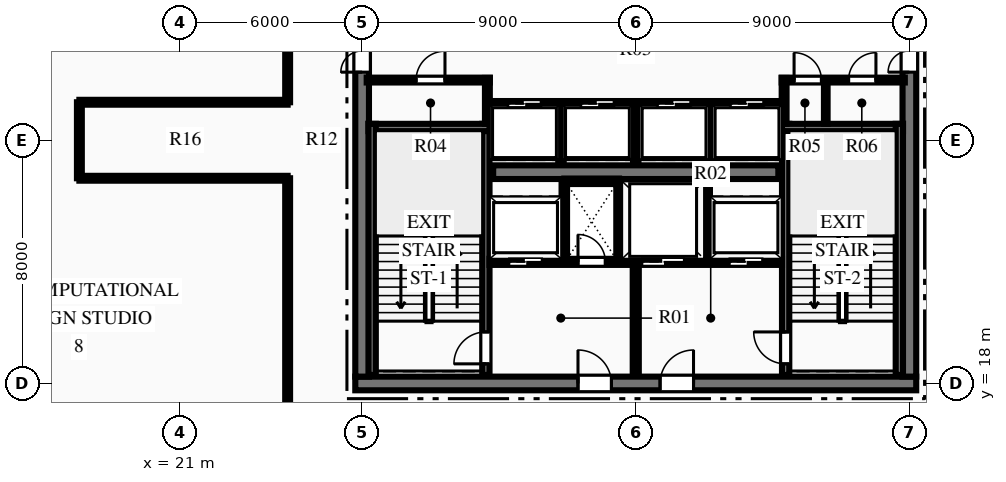
"""IFC4 building model, lengths in metres.
Left out: names, types, materials, properties, quantities, classifications, styles, units other than length and angle.
Written with IfcOpenShell. Run it as: python <this file> out.ifc"""

import sys

from ifc_helpers import new_model, si_unit, direction, frame, frame_2d, origin, place, context, subcontext, project, spatial, rectangle, extrude, element, fill, save


model = new_model("IFC4")
c1 = context("Model", 3, precision=1e-05, world=origin(), true_north=direction((0.0, 1.0)))
c2 = subcontext(c1, "Body", "Model", "MODEL_VIEW")
j1 = project(units=[si_unit("LENGTHUNIT", "METRE"), si_unit("PLANEANGLEUNIT", "RADIAN")], contexts=[c1])
p1 = place(None, origin())
s1 = spatial("IfcSite", under=j1, at=p1, CompositionType="ELEMENT")
p2 = place(p1, origin())
s2 = spatial("IfcBuilding", under=s1, at=p2, CompositionType="ELEMENT")
p3 = place(p2, frame((0.0, 0.0, 263.7)))
s3 = spatial("IfcBuildingStorey", under=s2, at=p3, CompositionType="ELEMENT", Elevation=263.7)
p4 = place(p3, frame((26.775, 18.0, 0.0), z_axis=(0.0, 0.0, 1.0), x_axis=(1.0, 0.0, 0.0)))
e1 = element("IfcWall", 1, at=p4, inside=s3, PredefinedType="SHEAR", context=c2, shape_type="SweptSolid", body=[
    extrude(rectangle(XDim=18.45, YDim=0.45, at=frame_2d((9.225, 0.0))), origin(), (0.0, 0.0, 1.0), 3.75),
])
p5 = place(p4, frame((7.325, 0.0, 0.0)))
e2 = element("IfcOpeningElement", 2, at=p5, cuts=e1, PredefinedType="OPENING", context=c2, shape_type="SweptSolid", body=[
    extrude(rectangle(XDim=1.1, YDim=2.15, at=frame_2d((0.55, 1.075))), frame((0.0, 0.235, 0.0), z_axis=(0.0, -1.0, 0.0), x_axis=(1.0, 0.0, 0.0)), (0.0, 0.0, 1.0), 0.47),
])
p6 = place(p4, frame((10.025, 0.0, 0.0)))
e3 = element("IfcOpeningElement", 3, at=p6, cuts=e1, PredefinedType="OPENING", context=c2, shape_type="SweptSolid", body=[
    extrude(rectangle(XDim=1.1, YDim=2.15, at=frame_2d((0.55, 1.075))), frame((0.0, 0.235, 0.0), z_axis=(0.0, -1.0, 0.0), x_axis=(1.0, 0.0, 0.0)), (0.0, 0.0, 1.0), 0.47),
])
p7 = place(p3, frame((27.0, 18.225, 0.0), z_axis=(0.0, 0.0, 1.0), x_axis=(0.0, 1.0, 0.0)))
e4 = element("IfcWall", 4, at=p7, inside=s3, PredefinedType="SHEAR", context=c2, shape_type="SweptSolid", body=[
    extrude(rectangle(XDim=15.55, YDim=0.45, at=frame_2d((7.775, 0.0))), origin(), (0.0, 0.0, 1.0), 3.75),
])
p8 = place(p7, frame((10.015, 0.0, 0.0)))
e5 = element("IfcOpeningElement", 5, at=p8, cuts=e4, PredefinedType="OPENING", context=c2, shape_type="SweptSolid", body=[
    extrude(rectangle(XDim=1.4, YDim=2.2, at=frame_2d((0.7, 1.1))), frame((0.0, 0.235, 0.0), z_axis=(0.0, -1.0, 0.0), x_axis=(1.0, 0.0, 0.0)), (0.0, 0.0, 1.0), 0.47),
])
p9 = place(p3, frame((45.0, 18.225, 0.0), z_axis=(0.0, 0.0, 1.0), x_axis=(0.0, 1.0, 0.0)))
e6 = element("IfcWall", 6, at=p9, inside=s3, PredefinedType="SHEAR", context=c2, shape_type="SweptSolid", body=[
    extrude(rectangle(XDim=15.55, YDim=0.45, at=frame_2d((7.775, 0.0))), origin(), (0.0, 0.0, 1.0), 3.75),
])
p10 = place(p9, frame((10.015, 0.0, 0.0)))
e7 = element("IfcOpeningElement", 7, at=p10, cuts=e6, PredefinedType="OPENING", context=c2, shape_type="SweptSolid", body=[
    extrude(rectangle(XDim=1.4, YDim=2.2, at=frame_2d((0.7, 1.1))), frame((0.0, 0.235, 0.0), z_axis=(0.0, -1.0, 0.0), x_axis=(1.0, 0.0, 0.0)), (0.0, 0.0, 1.0), 0.47),
])
p11 = place(p3, frame((31.31, 24.95, 0.0), z_axis=(0.0, 0.0, 1.0), x_axis=(1.0, 0.0, 0.0)))
e8 = element("IfcWall", 8, at=p11, inside=s3, PredefinedType="SHEAR", context=c2, shape_type="SweptSolid", body=[
    extrude(rectangle(XDim=9.38, YDim=0.45, at=frame_2d((4.69, 0.0))), origin(), (0.0, 0.0, 1.0), 3.75),
])
p12 = place(p3, frame((31.07, 18.28, 0.0), z_axis=(0.0, 0.0, 1.0), x_axis=(0.0, 1.0, 0.0)))
e9 = element("IfcWall", 9, at=p12, inside=s3, PredefinedType="SHEAR", context=c2, shape_type="SweptSolid", body=[
    extrude(rectangle(XDim=8.26, YDim=0.24, at=frame_2d((4.13, 0.0))), origin(), (0.0, 0.0, 1.0), 3.75),
])
p13 = place(p12, frame((0.365, 0.0, 0.0)))
e10 = element("IfcOpeningElement", 10, at=p13, cuts=e9, PredefinedType="OPENING", context=c2, shape_type="SweptSolid", body=[
    extrude(rectangle(XDim=1.05, YDim=2.15, at=frame_2d((0.525, 1.075))), frame((0.0, 0.13, 0.0), z_axis=(0.0, -1.0, 0.0), x_axis=(1.0, 0.0, 0.0)), (0.0, 0.0, 1.0), 0.26),
])
p14 = place(p3, frame((27.21, 26.42, 0.0), z_axis=(0.0, 0.0, 1.0), x_axis=(1.0, 0.0, 0.0)))
e11 = element("IfcWall", 11, at=p14, inside=s3, PredefinedType="SHEAR", context=c2, shape_type="SweptSolid", body=[
    extrude(rectangle(XDim=3.98, YDim=0.24, at=frame_2d((1.99, 0.0))), origin(), (0.0, 0.0, 1.0), 3.75),
])
p15 = place(p3, frame((27.33, 18.28, 0.0), z_axis=(0.0, 0.0, 1.0), x_axis=(0.0, 1.0, 0.0)))
e12 = element("IfcWall", 12, at=p15, inside=s3, PredefinedType="SHEAR", context=c2, shape_type="SweptSolid", body=[
    extrude(rectangle(XDim=8.26, YDim=0.24, at=frame_2d((4.13, 0.0))), origin(), (0.0, 0.0, 1.0), 3.75),
])
p16 = place(p3, frame((40.93, 18.28, 0.0), z_axis=(0.0, 0.0, 1.0), x_axis=(0.0, 1.0, 0.0)))
e13 = element("IfcWall", 13, at=p16, inside=s3, PredefinedType="SHEAR", context=c2, shape_type="SweptSolid", body=[
    extrude(rectangle(XDim=8.26, YDim=0.24, at=frame_2d((4.13, 0.0))), origin(), (0.0, 0.0, 1.0), 3.75),
])
p17 = place(p16, frame((0.365, 0.0, 0.0)))
e14 = element("IfcOpeningElement", 14, at=p17, cuts=e13, PredefinedType="OPENING", context=c2, shape_type="SweptSolid", body=[
    extrude(rectangle(XDim=1.05, YDim=2.15, at=frame_2d((0.525, 1.075))), frame((0.0, 0.13, 0.0), z_axis=(0.0, -1.0, 0.0), x_axis=(1.0, 0.0, 0.0)), (0.0, 0.0, 1.0), 0.26),
])
p18 = place(p3, frame((40.81, 26.42, 0.0), z_axis=(0.0, 0.0, 1.0), x_axis=(1.0, 0.0, 0.0)))
e15 = element("IfcWall", 15, at=p18, inside=s3, PredefinedType="SHEAR", context=c2, shape_type="SweptSolid", body=[
    extrude(rectangle(XDim=3.98, YDim=0.24, at=frame_2d((1.99, 0.0))), origin(), (0.0, 0.0, 1.0), 3.75),
])
p19 = place(p3, frame((44.67, 18.28, 0.0), z_axis=(0.0, 0.0, 1.0), x_axis=(0.0, 1.0, 0.0)))
e16 = element("IfcWall", 16, at=p19, inside=s3, PredefinedType="SHEAR", context=c2, shape_type="SweptSolid", body=[
    extrude(rectangle(XDim=8.26, YDim=0.24, at=frame_2d((4.13, 0.0))), origin(), (0.0, 0.0, 1.0), 3.75),
])
p20 = place(p3, frame((36.0, 18.28, 0.0), z_axis=(0.0, 0.0, 1.0), x_axis=(0.0, 1.0, 0.0)))
e17 = element("IfcWall", 17, at=p20, inside=s3, PredefinedType="PARTITIONING", context=c2, shape_type="SweptSolid", body=[
    extrude(rectangle(XDim=3.77, YDim=0.2, at=frame_2d((1.885, 0.0))), origin(), (0.0, 0.0, 1.0), 3.48),
])
p21 = place(p3, frame((31.19, 22.0, 0.0), z_axis=(0.0, 0.0, 1.0), x_axis=(1.0, 0.0, 0.0)))
e18 = element("IfcWall", 18, at=p21, inside=s3, PredefinedType="PARTITIONING", context=c2, shape_type="SweptSolid", body=[
    extrude(rectangle(XDim=4.69, YDim=0.2, at=frame_2d((2.345, 0.0))), origin(), (0.0, 0.0, 1.0), 3.48),
])
p22 = place(p21, frame((2.91, 0.0, 0.0)))
e19 = element("IfcOpeningElement", 19, at=p22, cuts=e18, PredefinedType="OPENING", context=c2, shape_type="SweptSolid", body=[
    extrude(rectangle(XDim=0.9, YDim=2.15, at=frame_2d((0.45, 1.075))), frame((0.0, 0.11, 0.0), z_axis=(0.0, -1.0, 0.0), x_axis=(1.0, 0.0, 0.0)), (0.0, 0.0, 1.0), 0.22),
])
p23 = place(p21, frame((0.635, 0.0, 0.0)))
e20 = element("IfcOpeningElement", 20, at=p23, cuts=e18, PredefinedType="OPENING", context=c2, shape_type="SweptSolid", body=[
    extrude(rectangle(XDim=1.1, YDim=2.15, at=frame_2d((0.55, 1.075))), frame((0.0, 0.11, 0.0), z_axis=(0.0, -1.0, 0.0), x_axis=(1.0, 0.0, 0.0)), (0.0, 0.0, 1.0), 0.22),
])
p24 = place(p3, frame((36.12, 22.0, 0.0), z_axis=(0.0, 0.0, 1.0), x_axis=(1.0, 0.0, 0.0)))
e21 = element("IfcWall", 21, at=p24, inside=s3, PredefinedType="PARTITIONING", context=c2, shape_type="SweptSolid", body=[
    extrude(rectangle(XDim=4.69, YDim=0.2, at=frame_2d((2.345, 0.0))), origin(), (0.0, 0.0, 1.0), 3.48),
])
p25 = place(p24, frame((2.955, 0.0, 0.0)))
e22 = element("IfcOpeningElement", 22, at=p25, cuts=e21, PredefinedType="OPENING", context=c2, shape_type="SweptSolid", body=[
    extrude(rectangle(XDim=1.1, YDim=2.15, at=frame_2d((0.55, 1.075))), frame((0.0, 0.11, 0.0), z_axis=(0.0, -1.0, 0.0), x_axis=(1.0, 0.0, 0.0)), (0.0, 0.0, 1.0), 0.22),
])
p26 = place(p24, frame((0.08, 0.0, 0.0)))
e23 = element("IfcOpeningElement", 23, at=p26, cuts=e21, PredefinedType="OPENING", context=c2, shape_type="SweptSolid", body=[
    extrude(rectangle(XDim=1.4, YDim=2.2, at=frame_2d((0.7, 1.1))), frame((0.0, 0.11, 0.0), z_axis=(0.0, -1.0, 0.0), x_axis=(1.0, 0.0, 0.0)), (0.0, 0.0, 1.0), 0.22),
])
for number, where, z_axis, x_axis in (
    (24, (33.65, 22.05, 0.0), (0.0, 0.0, 1.0), (0.0, 1.0, 0.0)),
    (25, (35.45, 22.05, 0.0), (0.0, 0.0, 1.0), (0.0, 1.0, 0.0)),
):
    element("IfcWall", number, at=place(p3, frame(where, z_axis=z_axis, x_axis=x_axis)), inside=s3, PredefinedType="PARTITIONING", context=c2, shape_type="SweptSolid", body=[
        extrude(rectangle(XDim=2.6, YDim=0.18, at=frame_2d((1.3, 0.0))), origin(), (0.0, 0.0, 1.0), 3.48),
    ])
p27 = place(p3, frame((33.65, 24.65, 0.0), z_axis=(0.0, 0.0, 1.0), x_axis=(1.0, 0.0, 0.0)))
e26 = element("IfcWall", 26, at=p27, inside=s3, PredefinedType="PARTITIONING", context=c2, shape_type="SweptSolid", body=[
    extrude(rectangle(XDim=1.8, YDim=0.18, at=frame_2d((0.9, 0.0))), origin(), (0.0, 0.0, 1.0), 3.48),
])
p28 = place(p3, frame((38.35, 22.05, 0.0), z_axis=(0.0, 0.0, 1.0), x_axis=(0.0, 1.0, 0.0)))
e27 = element("IfcWall", 27, at=p28, inside=s3, PredefinedType="PARTITIONING", context=c2, shape_type="SweptSolid", body=[
    extrude(rectangle(XDim=2.6, YDim=0.18, at=frame_2d((1.3, 0.0))), origin(), (0.0, 0.0, 1.0), 3.48),
])
p29 = place(p3, frame((27.15, 27.98, 0.0), z_axis=(0.0, 0.0, 1.0), x_axis=(1.0, 0.0, 0.0)))
e28 = element("IfcWall", 28, at=p29, inside=s3, PredefinedType="PARTITIONING", context=c2, shape_type="SweptSolid", body=[
    extrude(rectangle(XDim=4.05, YDim=0.16, at=frame_2d((2.025, 0.0))), origin(), (0.0, 0.0, 1.0), 3.48),
])
p30 = place(p29, frame((1.625, 0.0, 0.0)))
e29 = element("IfcOpeningElement", 29, at=p30, cuts=e28, PredefinedType="OPENING", context=c2, shape_type="SweptSolid", body=[
    extrude(rectangle(XDim=0.95, YDim=2.15, at=frame_2d((0.475, 1.075))), frame((0.0, 0.09, 0.0), z_axis=(0.0, -1.0, 0.0), x_axis=(1.0, 0.0, 0.0)), (0.0, 0.0, 1.0), 0.18),
])
p31 = place(p3, frame((31.12, 26.54, 0.0), z_axis=(0.0, 0.0, 1.0), x_axis=(0.0, 1.0, 0.0)))
e30 = element("IfcWall", 30, at=p31, inside=s3, PredefinedType="PARTITIONING", context=c2, shape_type="SweptSolid", body=[
    extrude(rectangle(XDim=1.51, YDim=0.16, at=frame_2d((0.755, 0.0))), origin(), (0.0, 0.0, 1.0), 3.48),
])
p32 = place(p3, frame((40.8, 27.98, 0.0), z_axis=(0.0, 0.0, 1.0), x_axis=(1.0, 0.0, 0.0)))
e31 = element("IfcWall", 31, at=p32, inside=s3, PredefinedType="PARTITIONING", context=c2, shape_type="SweptSolid", body=[
    extrude(rectangle(XDim=4.05, YDim=0.16, at=frame_2d((2.025, 0.0))), origin(), (0.0, 0.0, 1.0), 3.48),
])
p33 = place(p32, frame((0.407, 0.0, 0.0)))
e32 = element("IfcOpeningElement", 32, at=p33, cuts=e31, PredefinedType="OPENING", context=c2, shape_type="SweptSolid", body=[
    extrude(rectangle(XDim=0.9, YDim=2.15, at=frame_2d((0.45, 1.075))), frame((0.0, 0.09, 0.0), z_axis=(0.0, -1.0, 0.0), x_axis=(1.0, 0.0, 0.0)), (0.0, 0.0, 1.0), 0.18),
])
p34 = place(p32, frame((2.2, 0.0, 0.0)))
e33 = element("IfcOpeningElement", 33, at=p34, cuts=e31, PredefinedType="OPENING", context=c2, shape_type="SweptSolid", body=[
    extrude(rectangle(XDim=0.9, YDim=2.15, at=frame_2d((0.45, 1.075))), frame((0.0, 0.09, 0.0), z_axis=(0.0, -1.0, 0.0), x_axis=(1.0, 0.0, 0.0)), (0.0, 0.0, 1.0), 0.18),
])
p35 = place(p3, frame((40.88, 26.54, 0.0), z_axis=(0.0, 0.0, 1.0), x_axis=(0.0, 1.0, 0.0)))
e34 = element("IfcWall", 34, at=p35, inside=s3, PredefinedType="PARTITIONING", context=c2, shape_type="SweptSolid", body=[
    extrude(rectangle(XDim=1.51, YDim=0.16, at=frame_2d((0.755, 0.0))), origin(), (0.0, 0.0, 1.0), 3.48),
])
p36 = place(p3, frame((42.25, 26.54, 0.0), z_axis=(0.0, 0.0, 1.0), x_axis=(0.0, 1.0, 0.0)))
e35 = element("IfcWall", 35, at=p36, inside=s3, PredefinedType="PARTITIONING", context=c2, shape_type="SweptSolid", body=[
    extrude(rectangle(XDim=1.44, YDim=0.12, at=frame_2d((0.72, 0.0))), origin(), (0.0, 0.0, 1.0), 3.48),
])
p37 = place(p3, frame((31.2, 27.2, 0.0), z_axis=(0.0, 0.0, 1.0), x_axis=(1.0, 0.0, 0.0)))
e36 = element("IfcWall", 36, at=p37, inside=s3, PredefinedType="PARTITIONING", context=c2, shape_type="SweptSolid", body=[
    extrude(rectangle(XDim=9.6, YDim=0.18, at=frame_2d((4.8, 0.0))), origin(), (0.0, 0.0, 1.0), 3.48),
])
p38 = place(p37, frame((0.59, 0.0, 0.0)))
e37 = element("IfcOpeningElement", 37, at=p38, cuts=e36, PredefinedType="OPENING", context=c2, shape_type="SweptSolid", body=[
    extrude(rectangle(XDim=1.1, YDim=2.15, at=frame_2d((0.55, 1.075))), frame((0.0, 0.1, 0.0), z_axis=(0.0, -1.0, 0.0), x_axis=(1.0, 0.0, 0.0)), (0.0, 0.0, 1.0), 0.2),
])
p39 = place(p37, frame((2.99, 0.0, 0.0)))
e38 = element("IfcOpeningElement", 38, at=p39, cuts=e36, PredefinedType="OPENING", context=c2, shape_type="SweptSolid", body=[
    extrude(rectangle(XDim=1.1, YDim=2.15, at=frame_2d((0.55, 1.075))), frame((0.0, 0.1, 0.0), z_axis=(0.0, -1.0, 0.0), x_axis=(1.0, 0.0, 0.0)), (0.0, 0.0, 1.0), 0.2),
])
p40 = place(p37, frame((5.51, 0.0, 0.0)))
e39 = element("IfcOpeningElement", 39, at=p40, cuts=e36, PredefinedType="OPENING", context=c2, shape_type="SweptSolid", body=[
    extrude(rectangle(XDim=1.1, YDim=2.15, at=frame_2d((0.55, 1.075))), frame((0.0, 0.1, 0.0), z_axis=(0.0, -1.0, 0.0), x_axis=(1.0, 0.0, 0.0)), (0.0, 0.0, 1.0), 0.2),
])
p41 = place(p37, frame((7.91, 0.0, 0.0)))
e40 = element("IfcOpeningElement", 40, at=p41, cuts=e36, PredefinedType="OPENING", context=c2, shape_type="SweptSolid", body=[
    extrude(rectangle(XDim=1.1, YDim=2.15, at=frame_2d((0.55, 1.075))), frame((0.0, 0.1, 0.0), z_axis=(0.0, -1.0, 0.0), x_axis=(1.0, 0.0, 0.0)), (0.0, 0.0, 1.0), 0.2),
])
for number, where, z_axis, x_axis in (
    (41, (33.54, 25.3, 0.0), (0.0, 0.0, 1.0), (0.0, 1.0, 0.0)),
    (42, (36.0, 25.3, 0.0), (0.0, 0.0, 1.0), (0.0, 1.0, 0.0)),
    (43, (38.46, 25.3, 0.0), (0.0, 0.0, 1.0), (0.0, 1.0, 0.0)),
):
    element("IfcWall", number, at=place(p3, frame(where, z_axis=z_axis, x_axis=x_axis)), inside=s3, PredefinedType="PARTITIONING", context=c2, shape_type="SweptSolid", body=[
        extrude(rectangle(XDim=1.9, YDim=0.18, at=frame_2d((0.95, 0.0))), origin(), (0.0, 0.0, 1.0), 3.48),
    ])
p42 = place(p3, frame((24.55, 15.55, 0.0), z_axis=(0.0, 0.0, 1.0), x_axis=(0.0, 1.0, 0.0)))
e44 = element("IfcWall", 44, at=p42, inside=s3, PredefinedType="PARTITIONING", context=c2, shape_type="SweptSolid", body=[
    extrude(rectangle(XDim=9.2, YDim=0.16, at=frame_2d((4.6, 0.0))), origin(), (0.0, 0.0, 1.0), 3.48),
])
p43 = place(p3, frame((24.55, 27.25, 0.0), z_axis=(0.0, 0.0, 1.0), x_axis=(0.0, 1.0, 0.0)))
e45 = element("IfcWall", 45, at=p43, inside=s3, PredefinedType="PARTITIONING", context=c2, shape_type="SweptSolid", body=[
    extrude(rectangle(XDim=9.2, YDim=0.16, at=frame_2d((4.6, 0.0))), origin(), (0.0, 0.0, 1.0), 3.48),
])
p44 = place(p43, frame((2.419, 0.0, 0.0)))
e46 = element("IfcOpeningElement", 46, at=p44, cuts=e45, PredefinedType="OPENING", context=c2, shape_type="SweptSolid", body=[
    extrude(rectangle(XDim=1.05, YDim=2.15, at=frame_2d((0.525, 1.075))), frame((0.0, 0.09, 0.0), z_axis=(0.0, -1.0, 0.0), x_axis=(1.0, 0.0, 0.0)), (0.0, 0.0, 1.0), 0.18),
])
for number, where, z_axis, x_axis in (
    (47, (17.7, 24.75, 0.0), (0.0, 0.0, 1.0), (1.0, 0.0, 0.0)),
    (48, (17.7, 27.25, 0.0), (0.0, 0.0, 1.0), (1.0, 0.0, 0.0)),
):
    element("IfcWall", number, at=place(p3, frame(where, z_axis=z_axis, x_axis=x_axis)), inside=s3, PredefinedType="PARTITIONING", context=c2, shape_type="SweptSolid", body=[
        extrude(rectangle(XDim=6.85, YDim=0.16, at=frame_2d((3.425, 0.0))), origin(), (0.0, 0.0, 1.0), 3.48),
    ])
p45 = place(p3, frame((17.7, 24.75, 0.0), z_axis=(0.0, 0.0, 1.0), x_axis=(0.0, 1.0, 0.0)))
e49 = element("IfcWall", 49, at=p45, inside=s3, PredefinedType="PARTITIONING", context=c2, shape_type="SweptSolid", body=[
    extrude(rectangle(XDim=2.5, YDim=0.16, at=frame_2d((1.25, 0.0))), origin(), (0.0, 0.0, 1.0), 3.48),
])
p46 = place(p30, origin())
e50 = element("IfcDoor", 50, at=p46, inside=s3, OperationType="SINGLE_SWING_RIGHT", PredefinedType="DOOR", context=c2, shape_type="SweptSolid", body=[
    extrude(rectangle(XDim=0.95, YDim=2.15, at=frame_2d((0.475, 1.075))), frame((0.0, 0.025, 0.0), z_axis=(0.0, -1.0, 0.0), x_axis=(1.0, 0.0, 0.0)), (0.0, 0.0, 1.0), 0.05),
])
fill(e29, e50)
p47 = place(p33, origin())
e51 = element("IfcDoor", 51, at=p47, inside=s3, OperationType="SINGLE_SWING_LEFT", PredefinedType="DOOR", context=c2, shape_type="SweptSolid", body=[
    extrude(rectangle(XDim=0.9, YDim=2.15, at=frame_2d((0.45, 1.075))), frame((0.0, 0.025, 0.0), z_axis=(0.0, -1.0, 0.0), x_axis=(1.0, 0.0, 0.0)), (0.0, 0.0, 1.0), 0.05),
])
fill(e32, e51)
p48 = place(p34, origin())
e52 = element("IfcDoor", 52, at=p48, inside=s3, OperationType="SINGLE_SWING_RIGHT", PredefinedType="DOOR", context=c2, shape_type="SweptSolid", body=[
    extrude(rectangle(XDim=0.9, YDim=2.15, at=frame_2d((0.45, 1.075))), frame((0.0, 0.025, 0.0), z_axis=(0.0, -1.0, 0.0), x_axis=(1.0, 0.0, 0.0)), (0.0, 0.0, 1.0), 0.05),
])
fill(e33, e52)
p49 = place(p13, origin())
e53 = element("IfcDoor", 53, at=p49, inside=s3, OperationType="SINGLE_SWING_LEFT", PredefinedType="DOOR", context=c2, shape_type="SweptSolid", body=[
    extrude(rectangle(XDim=1.05, YDim=2.15, at=frame_2d((0.525, 1.075))), frame((0.0, 0.025, 0.0), z_axis=(0.0, -1.0, 0.0), x_axis=(1.0, 0.0, 0.0)), (0.0, 0.0, 1.0), 0.05),
])
fill(e10, e53)
p50 = place(p17, origin())
e54 = element("IfcDoor", 54, at=p50, inside=s3, OperationType="SINGLE_SWING_RIGHT", PredefinedType="DOOR", context=c2, shape_type="SweptSolid", body=[
    extrude(rectangle(XDim=1.05, YDim=2.15, at=frame_2d((0.525, 1.075))), frame((0.0, 0.025, 0.0), z_axis=(0.0, -1.0, 0.0), x_axis=(1.0, 0.0, 0.0)), (0.0, 0.0, 1.0), 0.05),
])
fill(e14, e54)
p51 = place(p5, origin())
e55 = element("IfcDoor", 55, at=p51, inside=s3, OperationType="SINGLE_SWING_LEFT", PredefinedType="DOOR", context=c2, shape_type="SweptSolid", body=[
    extrude(rectangle(XDim=1.1, YDim=2.15, at=frame_2d((0.55, 1.075))), frame((0.0, 0.025, 0.0), z_axis=(0.0, -1.0, 0.0), x_axis=(1.0, 0.0, 0.0)), (0.0, 0.0, 1.0), 0.05),
])
fill(e2, e55)
p52 = place(p6, origin())
e56 = element("IfcDoor", 56, at=p52, inside=s3, OperationType="SINGLE_SWING_RIGHT", PredefinedType="DOOR", context=c2, shape_type="SweptSolid", body=[
    extrude(rectangle(XDim=1.1, YDim=2.15, at=frame_2d((0.55, 1.075))), frame((0.0, 0.025, 0.0), z_axis=(0.0, -1.0, 0.0), x_axis=(1.0, 0.0, 0.0)), (0.0, 0.0, 1.0), 0.05),
])
fill(e3, e56)
p53 = place(p22, origin())
e57 = element("IfcDoor", 57, at=p53, inside=s3, OperationType="SINGLE_SWING_LEFT", PredefinedType="DOOR", context=c2, shape_type="SweptSolid", body=[
    extrude(rectangle(XDim=0.9, YDim=2.15, at=frame_2d((0.45, 1.075))), frame((0.0, 0.025, 0.0), z_axis=(0.0, -1.0, 0.0), x_axis=(1.0, 0.0, 0.0)), (0.0, 0.0, 1.0), 0.05),
])
fill(e19, e57)
p54 = place(p8, origin())
e58 = element("IfcDoor", 58, at=p54, inside=s3, OperationType="DOUBLE_DOOR_SINGLE_SWING", PredefinedType="DOOR", context=c2, shape_type="SweptSolid", body=[
    extrude(rectangle(XDim=1.4, YDim=2.2, at=frame_2d((0.7, 1.1))), frame((0.0, 0.025, 0.0), z_axis=(0.0, -1.0, 0.0), x_axis=(1.0, 0.0, 0.0)), (0.0, 0.0, 1.0), 0.05),
])
fill(e5, e58)
p55 = place(p10, origin())
e59 = element("IfcDoor", 59, at=p55, inside=s3, OperationType="DOUBLE_DOOR_SINGLE_SWING", PredefinedType="DOOR", context=c2, shape_type="SweptSolid", body=[
    extrude(rectangle(XDim=1.4, YDim=2.2, at=frame_2d((0.7, 1.1))), frame((0.0, 0.025, 0.0), z_axis=(0.0, -1.0, 0.0), x_axis=(1.0, 0.0, 0.0)), (0.0, 0.0, 1.0), 0.05),
])
fill(e7, e59)
p56 = place(p38, origin())
e60 = element("IfcDoor", 60, at=p56, inside=s3, OperationType="SLIDING_TO_LEFT", PredefinedType="DOOR", context=c2, shape_type="SweptSolid", body=[
    extrude(rectangle(XDim=1.1, YDim=2.15, at=frame_2d((0.55, 1.075))), frame((0.0, 0.025, 0.0), z_axis=(0.0, -1.0, 0.0), x_axis=(1.0, 0.0, 0.0)), (0.0, 0.0, 1.0), 0.05),
])
fill(e37, e60)
p57 = place(p39, origin())
e61 = element("IfcDoor", 61, at=p57, inside=s3, OperationType="SLIDING_TO_LEFT", PredefinedType="DOOR", context=c2, shape_type="SweptSolid", body=[
    extrude(rectangle(XDim=1.1, YDim=2.15, at=frame_2d((0.55, 1.075))), frame((0.0, 0.025, 0.0), z_axis=(0.0, -1.0, 0.0), x_axis=(1.0, 0.0, 0.0)), (0.0, 0.0, 1.0), 0.05),
])
fill(e38, e61)
p58 = place(p40, origin())
e62 = element("IfcDoor", 62, at=p58, inside=s3, OperationType="SLIDING_TO_LEFT", PredefinedType="DOOR", context=c2, shape_type="SweptSolid", body=[
    extrude(rectangle(XDim=1.1, YDim=2.15, at=frame_2d((0.55, 1.075))), frame((0.0, 0.025, 0.0), z_axis=(0.0, -1.0, 0.0), x_axis=(1.0, 0.0, 0.0)), (0.0, 0.0, 1.0), 0.05),
])
fill(e39, e62)
p59 = place(p41, origin())
e63 = element("IfcDoor", 63, at=p59, inside=s3, OperationType="SLIDING_TO_LEFT", PredefinedType="DOOR", context=c2, shape_type="SweptSolid", body=[
    extrude(rectangle(XDim=1.1, YDim=2.15, at=frame_2d((0.55, 1.075))), frame((0.0, 0.025, 0.0), z_axis=(0.0, -1.0, 0.0), x_axis=(1.0, 0.0, 0.0)), (0.0, 0.0, 1.0), 0.05),
])
fill(e40, e63)
p60 = place(p23, origin())
e64 = element("IfcDoor", 64, at=p60, inside=s3, OperationType="SLIDING_TO_LEFT", PredefinedType="DOOR", context=c2, shape_type="SweptSolid", body=[
    extrude(rectangle(XDim=1.1, YDim=2.15, at=frame_2d((0.55, 1.075))), frame((0.0, 0.025, 0.0), z_axis=(0.0, -1.0, 0.0), x_axis=(1.0, 0.0, 0.0)), (0.0, 0.0, 1.0), 0.05),
])
fill(e20, e64)
p61 = place(p25, origin())
e65 = element("IfcDoor", 65, at=p61, inside=s3, OperationType="SLIDING_TO_LEFT", PredefinedType="DOOR", context=c2, shape_type="SweptSolid", body=[
    extrude(rectangle(XDim=1.1, YDim=2.15, at=frame_2d((0.55, 1.075))), frame((0.0, 0.025, 0.0), z_axis=(0.0, -1.0, 0.0), x_axis=(1.0, 0.0, 0.0)), (0.0, 0.0, 1.0), 0.05),
])
fill(e22, e65)
p62 = place(p26, origin())
e66 = element("IfcDoor", 66, at=p62, inside=s3, OperationType="SLIDING_TO_LEFT", PredefinedType="DOOR", context=c2, shape_type="SweptSolid", body=[
    extrude(rectangle(XDim=1.4, YDim=2.2, at=frame_2d((0.7, 1.1))), frame((0.0, 0.025, 0.0), z_axis=(0.0, -1.0, 0.0), x_axis=(1.0, 0.0, 0.0)), (0.0, 0.0, 1.0), 0.05),
])
fill(e23, e66)
save(model, sys.argv[1])
